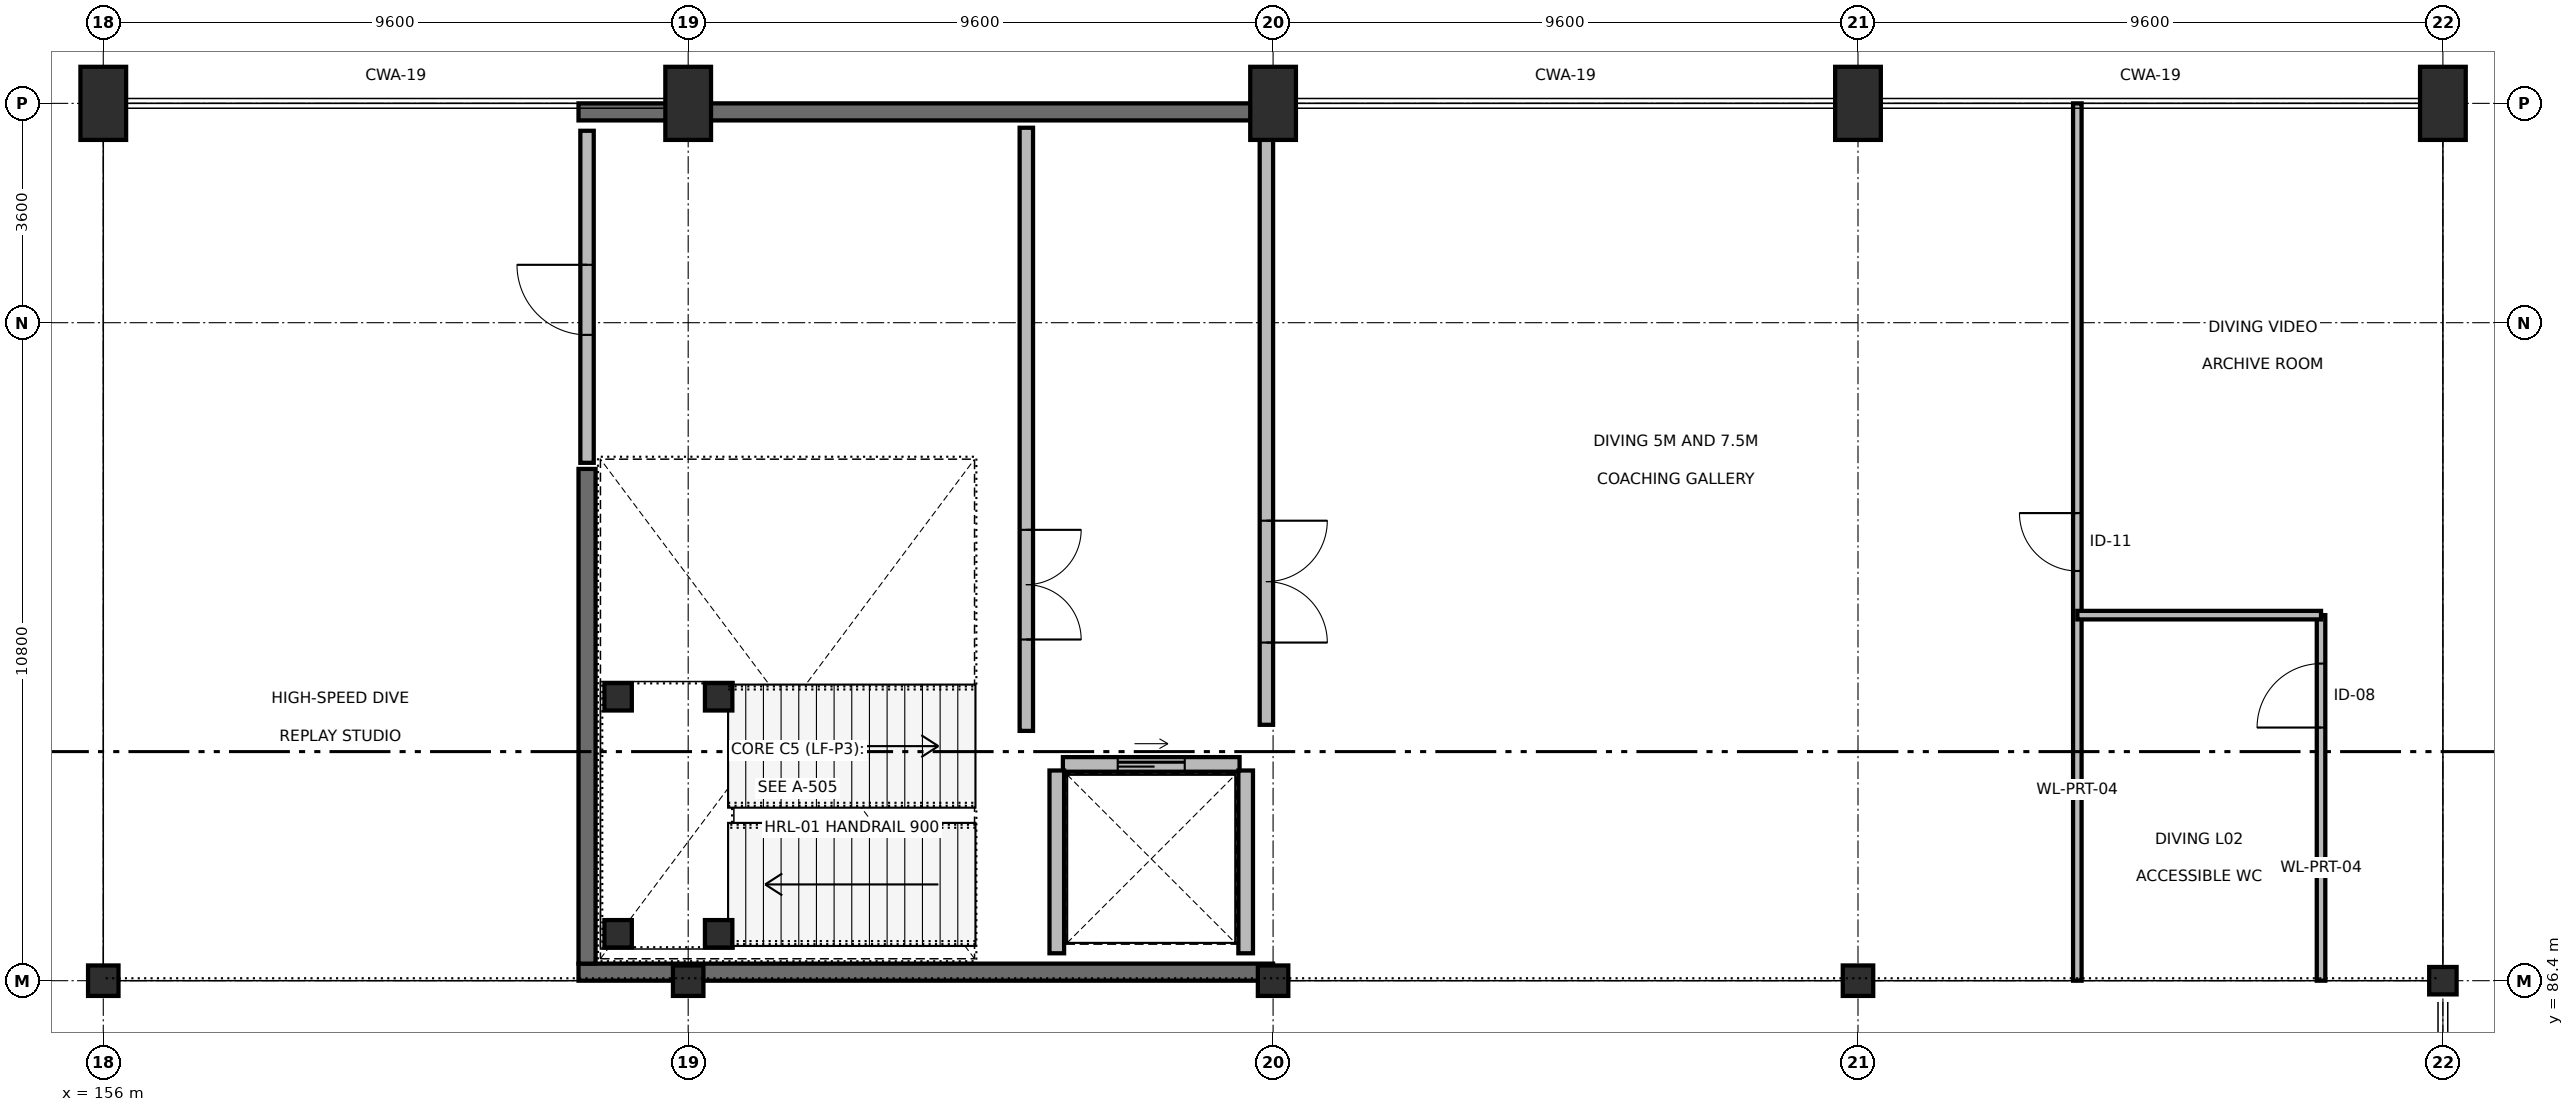
"""IFC4 building model, lengths in metres.
Left out: names, types, materials, properties, quantities, classifications, styles, units other than length and angle.
Written with IfcOpenShell. Run it as: python <this file> out.ifc"""

import sys

from ifc_helpers import new_model, si_unit, direction, frame, frame_2d, origin, origin_2d, place, context, subcontext, project, spatial, rectangle, extrude, element, fill, save


model = new_model("IFC4")
c1 = context("Model", 3, precision=1e-05, world=origin(), true_north=direction((0.0, 1.0)))
c2 = subcontext(c1, "Body", "Model", "MODEL_VIEW")
j1 = project(units=[si_unit("LENGTHUNIT", "METRE"), si_unit("PLANEANGLEUNIT", "RADIAN")], contexts=[c1])
p1 = place(None, origin())
s1 = spatial("IfcSite", under=j1, at=p1, CompositionType="ELEMENT")
p2 = place(p1, origin())
s2 = spatial("IfcBuilding", under=s1, at=p2, CompositionType="ELEMENT")
p3 = place(p2, frame((0.0, 0.0, 9.6)))
s3 = spatial("IfcBuildingStorey", under=s2, at=p3, CompositionType="ELEMENT", Elevation=9.6)
for number, where, z_axis, x_axis in (
    (1, (156.0, 100.8, 0.0), (0.0, 0.0, 1.0), (1.0, 0.0, 0.0)),
    (2, (165.6, 100.8, 0.0), (0.0, 0.0, 1.0), (1.0, 0.0, 0.0)),
    (3, (175.2, 100.8, 0.0), (0.0, 0.0, 1.0), (1.0, 0.0, 0.0)),
    (4, (184.8, 100.8, 0.0), (0.0, 0.0, 1.0), (1.0, 0.0, 0.0)),
    (5, (194.4, 100.8, 0.0), (0.0, 0.0, 1.0), (1.0, 0.0, 0.0)),
):
    element("IfcColumn", number, at=place(p3, frame(where, z_axis=z_axis, x_axis=x_axis)), inside=s3, PredefinedType="COLUMN", context=c2, shape_type="SweptSolid", body=[
        extrude(rectangle(XDim=0.75, YDim=1.2, at=origin_2d()), origin(), (0.0, 0.0, 1.0), 4.5),
    ])
for number, where, z_axis, x_axis in (
    (6, (156.0, 86.4, 0.0), (0.0, 0.0, 1.0), (1.0, 0.0, 0.0)),
    (7, (165.6, 86.4, 0.0), (0.0, 0.0, 1.0), (1.0, 0.0, 0.0)),
    (8, (175.2, 86.4, 0.0), (0.0, 0.0, 1.0), (1.0, 0.0, 0.0)),
    (9, (184.8, 86.4, 0.0), (0.0, 0.0, 1.0), (1.0, 0.0, 0.0)),
):
    element("IfcColumn", number, at=place(p3, frame(where, z_axis=z_axis, x_axis=x_axis)), inside=s3, PredefinedType="COLUMN", context=c2, shape_type="SweptSolid", body=[
        extrude(rectangle(XDim=0.5, YDim=0.5, at=origin_2d()), origin(), (0.0, 0.0, 1.0), 4.5),
    ])
p4 = place(p3, frame((194.4, 86.4, 0.0), z_axis=(0.0, 0.0, 1.0), x_axis=(1.0, 0.0, 0.0)))
e10 = element("IfcColumn", 10, at=p4, inside=s3, PredefinedType="COLUMN", context=c2, shape_type="SweptSolid", body=[
    extrude(rectangle(XDim=0.45, YDim=0.45, at=origin_2d()), origin(), (0.0, 0.0, 1.0), 4.5),
])
for number, where, z_axis, x_axis in (
    (11, (163.8, 86.54, 0.0), (0.0, 0.0, 1.0), (1.0, 0.0, 0.0)),
    (12, (163.8, 100.66, 0.0), (0.0, 0.0, 1.0), (1.0, 0.0, 0.0)),
):
    element("IfcWall", number, at=place(p3, frame(where, z_axis=z_axis, x_axis=x_axis)), inside=s3, PredefinedType="SHEAR", context=c2, shape_type="SweptSolid", body=[
        extrude(rectangle(XDim=11.4, YDim=0.28, at=frame_2d((5.7, 0.0))), origin(), (0.0, 0.0, 1.0), 4.5),
    ])
p5 = place(p3, frame((163.94, 86.68, 0.0), z_axis=(0.0, 0.0, 1.0), x_axis=(0.0, 1.0, 0.0)))
e13 = element("IfcWall", 13, at=p5, inside=s3, PredefinedType="SHEAR", context=c2, shape_type="SweptSolid", body=[
    extrude(rectangle(XDim=8.12, YDim=0.28, at=frame_2d((4.06, 0.0))), origin(), (0.0, 0.0, 1.0), 4.5),
])
p6 = place(p3, frame((171.15, 90.5, 0.0), z_axis=(0.0, 0.0, 1.0), x_axis=(0.0, 1.0, 0.0)))
e14 = element("IfcWall", 14, at=p6, inside=s3, PredefinedType="PARTITIONING", context=c2, shape_type="SweptSolid", body=[
    extrude(rectangle(XDim=9.9, YDim=0.22, at=frame_2d((4.95, 0.0))), origin(), (0.0, 0.0, 1.0), 4.205),
])
p7 = place(p6, frame((1.5, 0.0, 0.0)))
e15 = element("IfcOpeningElement", 15, at=p7, cuts=e14, PredefinedType="OPENING", context=c2, shape_type="SweptSolid", body=[
    extrude(rectangle(XDim=1.8, YDim=2.2, at=frame_2d((0.9, 1.1))), frame((0.0, 0.12, 0.0), z_axis=(0.0, -1.0, 0.0), x_axis=(1.0, 0.0, 0.0)), (0.0, 0.0, 1.0), 0.24),
])
p8 = place(p3, frame((171.75, 89.95, 0.0), z_axis=(0.0, 0.0, 1.0), x_axis=(1.0, 0.0, 0.0)))
e16 = element("IfcWall", 16, at=p8, inside=s3, PredefinedType="SOLIDWALL", context=c2, shape_type="SweptSolid", body=[
    extrude(rectangle(XDim=2.9, YDim=0.24, at=frame_2d((1.45, 0.0))), origin(), (0.0, 0.0, 1.0), 4.205),
])
p9 = place(p8, frame((0.9, 0.0, 0.0)))
e17 = element("IfcOpeningElement", 17, at=p9, cuts=e16, PredefinedType="OPENING", context=c2, shape_type="SweptSolid", body=[
    extrude(rectangle(XDim=1.1, YDim=2.15, at=frame_2d((0.55, 1.075))), frame((0.0, 0.13, 0.0), z_axis=(0.0, -1.0, 0.0), x_axis=(1.0, 0.0, 0.0)), (0.0, 0.0, 1.0), 0.26),
])
for number, where, z_axis, x_axis in (
    (18, (171.65, 86.85, 0.0), (0.0, 0.0, 1.0), (0.0, 1.0, 0.0)),
    (19, (174.75, 86.85, 0.0), (0.0, 0.0, 1.0), (0.0, 1.0, 0.0)),
):
    element("IfcWall", number, at=place(p3, frame(where, z_axis=z_axis, x_axis=x_axis)), inside=s3, PredefinedType="SOLIDWALL", context=c2, shape_type="SweptSolid", body=[
        extrude(rectangle(XDim=3.0, YDim=0.24, at=frame_2d((1.5, 0.0))), origin(), (0.0, 0.0, 1.0), 4.205),
    ])
p10 = place(p3, frame((175.09, 90.6, 0.0), z_axis=(0.0, 0.0, 1.0), x_axis=(0.0, 1.0, 0.0)))
e20 = element("IfcWall", 20, at=p10, inside=s3, PredefinedType="PARTITIONING", context=c2, shape_type="SweptSolid", body=[
    extrude(rectangle(XDim=9.75, YDim=0.22, at=frame_2d((4.875, 0.0))), origin(), (0.0, 0.0, 1.0), 3.485),
])
p11 = place(p10, frame((1.35, 0.0, 0.0)))
e21 = element("IfcOpeningElement", 21, at=p11, cuts=e20, PredefinedType="OPENING", context=c2, shape_type="SweptSolid", body=[
    extrude(rectangle(XDim=2.0, YDim=2.2, at=frame_2d((1.0, 1.1))), frame((0.0, 0.12, 0.0), z_axis=(0.0, -1.0, 0.0), x_axis=(1.0, 0.0, 0.0)), (0.0, 0.0, 1.0), 0.24),
])
p12 = place(p3, frame((163.94, 94.9, 0.0), z_axis=(0.0, 0.0, 1.0), x_axis=(0.0, 1.0, 0.0)))
e22 = element("IfcWall", 22, at=p12, inside=s3, PredefinedType="PARTITIONING", context=c2, shape_type="SweptSolid", body=[
    extrude(rectangle(XDim=5.45, YDim=0.22, at=frame_2d((2.725, 0.0))), origin(), (0.0, 0.0, 1.0), 4.205),
])
p13 = place(p12, frame((2.1, 0.0, 0.0)))
e23 = element("IfcOpeningElement", 23, at=p13, cuts=e22, PredefinedType="OPENING", context=c2, shape_type="SweptSolid", body=[
    extrude(rectangle(XDim=1.15, YDim=2.2, at=frame_2d((0.575, 1.1))), frame((0.0, 0.12, 0.0), z_axis=(0.0, -1.0, 0.0), x_axis=(1.0, 0.0, 0.0)), (0.0, 0.0, 1.0), 0.24),
])
p14 = place(p3, frame((188.4, 86.4, 0.0), z_axis=(0.0, 0.0, 1.0), x_axis=(0.0, 1.0, 0.0)))
e24 = element("IfcWall", 24, at=p14, inside=s3, PredefinedType="PARTITIONING", context=c2, shape_type="SweptSolid", body=[
    extrude(rectangle(XDim=14.4, YDim=0.14, at=frame_2d((7.2, 0.0))), origin(), (0.0, 0.0, 1.0), 4.205),
])
p15 = place(p14, frame((6.725, 0.0, 0.0)))
e25 = element("IfcOpeningElement", 25, at=p15, cuts=e24, PredefinedType="OPENING", context=c2, shape_type="SweptSolid", body=[
    extrude(rectangle(XDim=0.95, YDim=2.1, at=frame_2d((0.475, 1.05))), frame((0.0, 0.08, 0.0), z_axis=(0.0, -1.0, 0.0), x_axis=(1.0, 0.0, 0.0)), (0.0, 0.0, 1.0), 0.16),
])
p16 = place(p3, frame((192.4, 86.4, 0.0), z_axis=(0.0, 0.0, 1.0), x_axis=(0.0, 1.0, 0.0)))
e26 = element("IfcWall", 26, at=p16, inside=s3, PredefinedType="PARTITIONING", context=c2, shape_type="SweptSolid", body=[
    extrude(rectangle(XDim=6.0, YDim=0.14, at=frame_2d((3.0, 0.0))), origin(), (0.0, 0.0, 1.0), 4.205),
])
p17 = place(p16, frame((4.155, 0.0, 0.0)))
e27 = element("IfcOpeningElement", 27, at=p17, cuts=e26, PredefinedType="OPENING", context=c2, shape_type="SweptSolid", body=[
    extrude(rectangle(XDim=1.05, YDim=2.2, at=frame_2d((0.525, 1.1))), frame((0.0, 0.08, 0.0), z_axis=(0.0, -1.0, 0.0), x_axis=(1.0, 0.0, 0.0)), (0.0, 0.0, 1.0), 0.16),
])
p18 = place(p3, frame((188.4, 92.4, 0.0), z_axis=(0.0, 0.0, 1.0), x_axis=(1.0, 0.0, 0.0)))
e28 = element("IfcWall", 28, at=p18, inside=s3, PredefinedType="PARTITIONING", context=c2, shape_type="SweptSolid", body=[
    extrude(rectangle(XDim=4.0, YDim=0.14, at=frame_2d((2.0, 0.0))), origin(), (0.0, 0.0, 1.0), 4.205),
])
for number, where, z_axis, x_axis in (
    (29, (164.45, 87.17, 0.0), (0.0, 0.0, 1.0), (1.0, 0.0, 0.0)),
    (30, (166.1, 87.17, 0.0), (0.0, 0.0, 1.0), (1.0, 0.0, 0.0)),
    (31, (164.45, 91.06, 0.0), (0.0, 0.0, 1.0), (1.0, 0.0, 0.0)),
    (32, (166.1, 91.06, 0.0), (0.0, 0.0, 1.0), (1.0, 0.0, 0.0)),
):
    element("IfcColumn", number, at=place(p3, frame(where, z_axis=z_axis, x_axis=x_axis)), inside=s3, PredefinedType="COLUMN", context=c2, shape_type="SweptSolid", body=[
        extrude(rectangle(XDim=0.45, YDim=0.45, at=origin_2d()), origin(), (0.0, 0.0, 1.0), 4.5),
    ])
p19 = place(p7, origin())
e33 = element("IfcDoor", 33, at=p19, inside=s3, OperationType="DOUBLE_DOOR_SINGLE_SWING", PredefinedType="DOOR", context=c2, shape_type="SweptSolid", body=[
    extrude(rectangle(XDim=1.8, YDim=2.2, at=frame_2d((0.9, 1.1))), frame((0.0, 0.025, 0.0), z_axis=(0.0, -1.0, 0.0), x_axis=(1.0, 0.0, 0.0)), (0.0, 0.0, 1.0), 0.05),
])
fill(e15, e33)
p20 = place(p9, origin())
e34 = element("IfcDoor", 34, at=p20, inside=s3, OperationType="DOUBLE_DOOR_SLIDING", PredefinedType="DOOR", context=c2, shape_type="SweptSolid", body=[
    extrude(rectangle(XDim=1.1, YDim=2.15, at=frame_2d((0.55, 1.075))), frame((0.0, 0.025, 0.0), z_axis=(0.0, -1.0, 0.0), x_axis=(1.0, 0.0, 0.0)), (0.0, 0.0, 1.0), 0.05),
])
fill(e17, e34)
p21 = place(p11, origin())
e35 = element("IfcDoor", 35, at=p21, inside=s3, OperationType="DOUBLE_DOOR_SINGLE_SWING", PredefinedType="DOOR", context=c2, shape_type="SweptSolid", body=[
    extrude(rectangle(XDim=2.0, YDim=2.2, at=frame_2d((1.0, 1.1))), frame((0.0, 0.025, 0.0), z_axis=(0.0, -1.0, 0.0), x_axis=(1.0, 0.0, 0.0)), (0.0, 0.0, 1.0), 0.05),
])
fill(e21, e35)
p22 = place(p13, origin())
e36 = element("IfcDoor", 36, at=p22, inside=s3, OperationType="SINGLE_SWING_RIGHT", PredefinedType="DOOR", context=c2, shape_type="SweptSolid", body=[
    extrude(rectangle(XDim=1.15, YDim=2.2, at=frame_2d((0.575, 1.1))), frame((0.0, 0.025, 0.0), z_axis=(0.0, -1.0, 0.0), x_axis=(1.0, 0.0, 0.0)), (0.0, 0.0, 1.0), 0.05),
])
fill(e23, e36)
p23 = place(p15, origin())
e37 = element("IfcDoor", 37, at=p23, inside=s3, OperationType="SINGLE_SWING_RIGHT", PredefinedType="DOOR", context=c2, shape_type="SweptSolid", body=[
    extrude(rectangle(XDim=0.95, YDim=2.1, at=frame_2d((0.475, 1.05))), frame((0.0, 0.025, 0.0), z_axis=(0.0, -1.0, 0.0), x_axis=(1.0, 0.0, 0.0)), (0.0, 0.0, 1.0), 0.05),
])
fill(e25, e37)
p24 = place(p17, origin())
e38 = element("IfcDoor", 38, at=p24, inside=s3, OperationType="SINGLE_SWING_LEFT", PredefinedType="DOOR", context=c2, shape_type="SweptSolid", body=[
    extrude(rectangle(XDim=1.05, YDim=2.2, at=frame_2d((0.525, 1.1))), frame((0.0, 0.025, 0.0), z_axis=(0.0, -1.0, 0.0), x_axis=(1.0, 0.0, 0.0)), (0.0, 0.0, 1.0), 0.05),
])
fill(e27, e38)
save(model, sys.argv[1])
